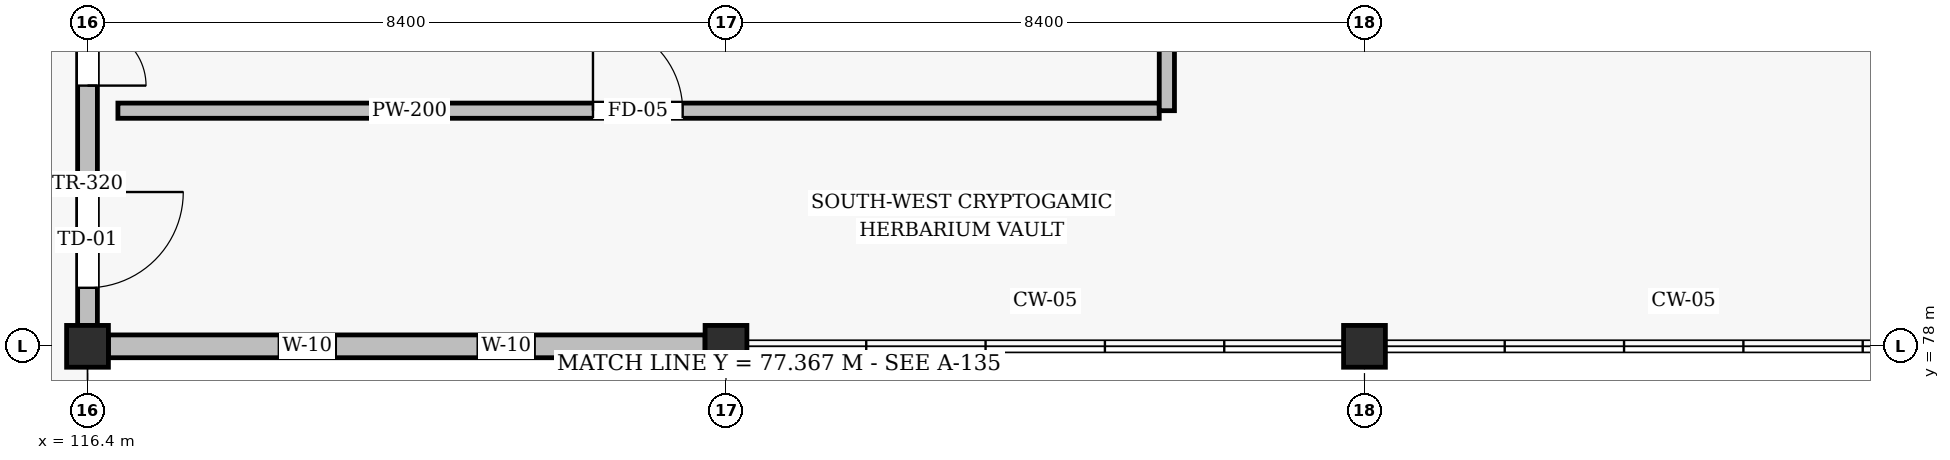
"""IFC4 building model, lengths in metres.
Left out: names, types, materials, properties, quantities, classifications, styles, units other than length and angle.
Written with IfcOpenShell. Run it as: python <this file> out.ifc"""

import sys

from ifc_helpers import new_model, si_unit, direction, frame, frame_2d, origin, origin_2d, place, context, subcontext, project, spatial, rectangle, hollow_rectangle, extrude, element, fill, save


model = new_model("IFC4")
c1 = context("Model", 3, precision=1e-05, world=origin(), true_north=direction((0.0, 1.0)))
c2 = subcontext(c1, "Body", "Model", "MODEL_VIEW")
j1 = project(units=[si_unit("LENGTHUNIT", "METRE"), si_unit("PLANEANGLEUNIT", "RADIAN")], contexts=[c1])
p1 = place(None, origin())
s1 = spatial("IfcSite", under=j1, at=p1, CompositionType="ELEMENT")
p2 = place(p1, origin())
s2 = spatial("IfcBuilding", under=s1, at=p2, CompositionType="ELEMENT")
p3 = place(p2, frame((0.0, 0.0, 13.2)))
s3 = spatial("IfcBuildingStorey", under=s2, at=p3, CompositionType="ELEMENT", Elevation=13.2)
for number, where, z_axis, x_axis in (
    (1, (116.4, 78.0, 0.0), (0.0, 0.0, 1.0), (1.0, 0.0, 0.0)),
    (2, (124.8, 78.0, 0.0), (0.0, 0.0, 1.0), (1.0, 0.0, 0.0)),
    (3, (133.2, 78.0, 0.0), (0.0, 0.0, 1.0), (1.0, 0.0, 0.0)),
):
    element("IfcColumn", number, at=place(p3, frame(where, z_axis=z_axis, x_axis=x_axis)), inside=s3, PredefinedType="COLUMN", context=c2, shape_type="SweptSolid", body=[
        extrude(hollow_rectangle(XDim=0.55, YDim=0.55, WallThickness=0.022, InnerFilletRadius=0.022, OuterFilletRadius=0.044, at=origin_2d()), origin(), (0.0, 0.0, 1.0), 3.9),
    ])
p4 = place(p3, frame((116.4, 86.125, 0.0), z_axis=(0.0, 0.0, 1.0), x_axis=(0.0, -1.0, 0.0)))
e4 = element("IfcWall", 4, at=p4, inside=s3, PredefinedType="SOLIDWALL", context=c2, shape_type="SweptSolid", body=[
    extrude(rectangle(XDim=7.85, YDim=0.26, at=frame_2d((3.925, 0.0))), origin(), (0.0, 0.0, 1.0), 3.12),
])
p5 = place(p4, frame((3.155, 0.0, 0.0)))
e5 = element("IfcOpeningElement", 5, at=p5, cuts=e4, PredefinedType="OPENING", context=c2, shape_type="SweptSolid", body=[
    extrude(rectangle(XDim=1.54, YDim=2.24, at=frame_2d((0.77, 1.12))), frame((0.0, 0.14, 0.0), z_axis=(0.0, -1.0, 0.0), x_axis=(1.0, 0.0, 0.0)), (0.0, 0.0, 1.0), 0.28),
])
p6 = place(p4, frame((6.095, 0.0, 0.0)))
e6 = element("IfcOpeningElement", 6, at=p6, cuts=e4, PredefinedType="OPENING", context=c2, shape_type="SweptSolid", body=[
    extrude(rectangle(XDim=1.26, YDim=2.24, at=frame_2d((0.63, 1.12))), frame((0.0, 0.14, 0.0), z_axis=(0.0, -1.0, 0.0), x_axis=(1.0, 0.0, 0.0)), (0.0, 0.0, 1.0), 0.28),
])
p7 = place(p3, frame((116.675, 78.0, 0.0), z_axis=(0.0, 0.0, 1.0), x_axis=(1.0, 0.0, 0.0)))
e7 = element("IfcWall", 7, at=p7, inside=s3, PredefinedType="SOLIDWALL", context=c2, shape_type="SweptSolid", body=[
    extrude(rectangle(XDim=7.85, YDim=0.3, at=frame_2d((3.925, 0.0))), origin(), (0.0, 0.0, 1.0), 2.928),
])
p8 = place(p7, frame((2.242, 0.0, 1.05)))
e8 = element("IfcOpeningElement", 8, at=p8, cuts=e7, PredefinedType="OPENING", context=c2, shape_type="SweptSolid", body=[
    extrude(rectangle(XDim=0.75, YDim=1.58, at=frame_2d((0.375, 0.79))), frame((0.0, 0.16, 0.0), z_axis=(0.0, -1.0, 0.0), x_axis=(1.0, 0.0, 0.0)), (0.0, 0.0, 1.0), 0.32),
])
p9 = place(p7, frame((4.858, 0.0, 1.05)))
e9 = element("IfcOpeningElement", 9, at=p9, cuts=e7, PredefinedType="OPENING", context=c2, shape_type="SweptSolid", body=[
    extrude(rectangle(XDim=0.75, YDim=1.58, at=frame_2d((0.375, 0.79))), frame((0.0, 0.16, 0.0), z_axis=(0.0, -1.0, 0.0), x_axis=(1.0, 0.0, 0.0)), (0.0, 0.0, 1.0), 0.32),
])
p10 = place(p3, frame((116.8, 81.1, 0.0), z_axis=(0.0, 0.0, 1.0), x_axis=(1.0, 0.0, 0.0)))
e10 = element("IfcWall", 10, at=p10, inside=s3, PredefinedType="SOLIDWALL", context=c2, shape_type="SweptSolid", body=[
    extrude(rectangle(XDim=13.7, YDim=0.2, at=frame_2d((6.85, 0.0))), origin(), (0.0, 0.0, 1.0), 3.23),
])
p11 = place(p10, frame((6.25, 0.0, 0.0)))
e11 = element("IfcOpeningElement", 11, at=p11, cuts=e10, PredefinedType="OPENING", context=c2, shape_type="SweptSolid", body=[
    extrude(rectangle(XDim=1.18, YDim=2.15, at=frame_2d((0.59, 1.075))), frame((0.0, 0.11, 0.0), z_axis=(0.0, -1.0, 0.0), x_axis=(1.0, 0.0, 0.0)), (0.0, 0.0, 1.0), 0.22),
])
p12 = place(p3, frame((130.6, 81.1, 0.0), z_axis=(0.0, 0.0, 1.0), x_axis=(0.0, 1.0, 0.0)))
e12 = element("IfcWall", 12, at=p12, inside=s3, PredefinedType="SOLIDWALL", context=c2, shape_type="SweptSolid", body=[
    extrude(rectangle(XDim=11.2, YDim=0.2, at=frame_2d((5.6, 0.0))), origin(), (0.0, 0.0, 1.0), 3.07),
])
p13 = place(p5, frame((1.54, 0.0, 0.0), z_axis=(0.0, 0.0, 1.0), x_axis=(-1.0, 0.0, 0.0)))
e13 = element("IfcDoor", 13, at=p13, inside=s3, OperationType="DOUBLE_DOOR_SINGLE_SWING", PredefinedType="DOOR", context=c2, shape_type="SweptSolid", body=[
    extrude(rectangle(XDim=1.54, YDim=2.24, at=frame_2d((0.77, 1.12))), frame((0.0, 0.025, 0.0), z_axis=(0.0, -1.0, 0.0), x_axis=(1.0, 0.0, 0.0)), (0.0, 0.0, 1.0), 0.05),
])
fill(e5, e13)
p14 = place(p6, frame((1.26, 0.0, 0.0), z_axis=(0.0, 0.0, 1.0), x_axis=(-1.0, 0.0, 0.0)))
e14 = element("IfcDoor", 14, at=p14, inside=s3, OperationType="SINGLE_SWING_LEFT", PredefinedType="DOOR", context=c2, shape_type="SweptSolid", body=[
    extrude(rectangle(XDim=1.26, YDim=2.24, at=frame_2d((0.63, 1.12))), frame((0.0, 0.025, 0.0), z_axis=(0.0, -1.0, 0.0), x_axis=(1.0, 0.0, 0.0)), (0.0, 0.0, 1.0), 0.05),
])
fill(e6, e14)
p15 = place(p8, origin())
e15 = element("IfcWindow", 15, at=p15, inside=s3, PartitioningType="SINGLE_PANEL", PredefinedType="WINDOW", context=c2, shape_type="SweptSolid", body=[
    extrude(rectangle(XDim=0.75, YDim=1.58, at=frame_2d((0.375, 0.79))), frame((0.0, 0.03, 0.0), z_axis=(0.0, -1.0, 0.0), x_axis=(1.0, 0.0, 0.0)), (0.0, 0.0, 1.0), 0.06),
])
fill(e8, e15)
p16 = place(p9, origin())
e16 = element("IfcWindow", 16, at=p16, inside=s3, PartitioningType="SINGLE_PANEL", PredefinedType="WINDOW", context=c2, shape_type="SweptSolid", body=[
    extrude(rectangle(XDim=0.75, YDim=1.58, at=frame_2d((0.375, 0.79))), frame((0.0, 0.03, 0.0), z_axis=(0.0, -1.0, 0.0), x_axis=(1.0, 0.0, 0.0)), (0.0, 0.0, 1.0), 0.06),
])
fill(e9, e16)
p17 = place(p11, origin())
e17 = element("IfcDoor", 17, at=p17, inside=s3, OperationType="SINGLE_SWING_LEFT", PredefinedType="DOOR", context=c2, shape_type="SweptSolid", body=[
    extrude(rectangle(XDim=1.18, YDim=2.15, at=frame_2d((0.59, 1.075))), frame((0.0, 0.025, 0.0), z_axis=(0.0, -1.0, 0.0), x_axis=(1.0, 0.0, 0.0)), (0.0, 0.0, 1.0), 0.05),
])
fill(e11, e17)
save(model, sys.argv[1])
